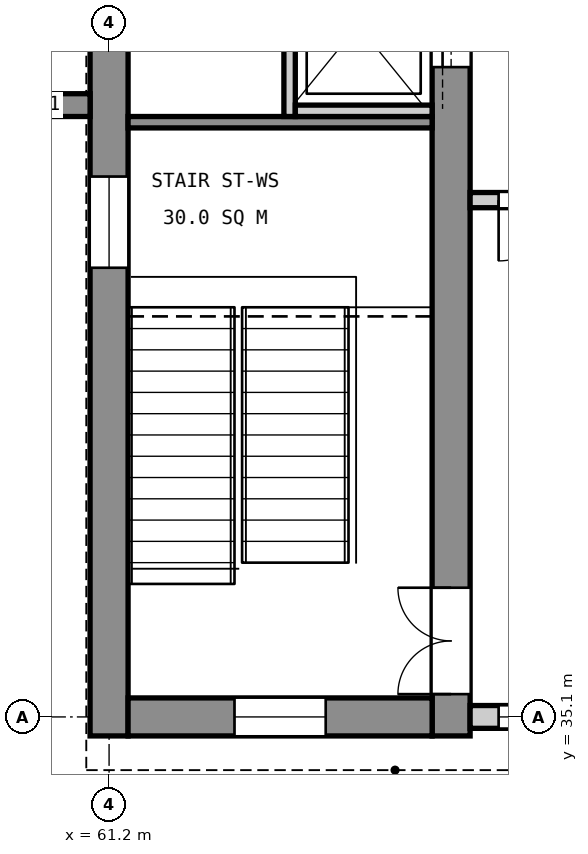
"""IFC4 building model, lengths in metres.
Left out: names, types, materials, properties, quantities, classifications, styles, units other than length and angle.
Written with IfcOpenShell. Run it as: python <this file> out.ifc"""

import sys

from ifc_helpers import new_model, si_unit, direction, frame, frame_2d, origin, place, context, subcontext, project, spatial, rectangle, extrude, element, fill, save


model = new_model("IFC4")
c1 = context("Model", 3, precision=1e-05, world=origin(), true_north=direction((0.0, 1.0)))
c2 = subcontext(c1, "Body", "Model", "MODEL_VIEW")
j1 = project(units=[si_unit("LENGTHUNIT", "METRE"), si_unit("PLANEANGLEUNIT", "RADIAN")], contexts=[c1])
p1 = place(None, origin())
s1 = spatial("IfcSite", under=j1, at=p1, CompositionType="ELEMENT")
p2 = place(p1, origin())
s2 = spatial("IfcBuilding", under=s1, at=p2, CompositionType="ELEMENT")
p3 = place(p2, frame((0.0, 0.0, 27.0)))
s3 = spatial("IfcBuildingStorey", under=s2, at=p3, CompositionType="ELEMENT", Elevation=27.0)
p4 = place(p3, frame((61.2, 34.85, 0.0), z_axis=(0.0, 0.0, 1.0), x_axis=(0.0, 1.0, 0.0)))
e1 = element("IfcWall", 1, at=p4, inside=s3, PredefinedType="SHEAR", context=c2, shape_type="SweptSolid", body=[
    extrude(rectangle(XDim=11.3, YDim=0.5, at=frame_2d((5.65, 0.0))), origin(), (0.0, 0.0, 1.0), 4.55),
])
p5 = place(p4, frame((6.16, 0.0, 3.4)))
e2 = element("IfcOpeningElement", 2, at=p5, cuts=e1, PredefinedType="OPENING", context=c2, shape_type="SweptSolid", body=[
    extrude(rectangle(XDim=1.2, YDim=0.9, at=frame_2d((0.6, 0.45))), frame((0.0, 0.26, 0.0), z_axis=(0.0, -1.0, 0.0), x_axis=(1.0, 0.0, 0.0)), (0.0, 0.0, 1.0), 0.52),
])
p6 = place(p3, frame((65.7, 34.85, 0.0), z_axis=(0.0, 0.0, 1.0), x_axis=(0.0, 1.0, 0.0)))
e3 = element("IfcWall", 3, at=p6, inside=s3, PredefinedType="SHEAR", context=c2, shape_type="SweptSolid", body=[
    extrude(rectangle(XDim=11.3, YDim=0.5, at=frame_2d((5.65, 0.0))), origin(), (0.0, 0.0, 1.0), 4.55),
])
p7 = place(p6, frame((0.55, 0.0, 0.0)))
e4 = element("IfcOpeningElement", 4, at=p7, cuts=e3, PredefinedType="OPENING", context=c2, shape_type="SweptSolid", body=[
    extrude(rectangle(XDim=1.4, YDim=2.1, at=frame_2d((0.7, 1.05))), frame((0.0, 0.26, 0.0), z_axis=(0.0, -1.0, 0.0), x_axis=(1.0, 0.0, 0.0)), (0.0, 0.0, 1.0), 0.52),
])
p8 = place(p6, frame((8.8, 0.0, 0.0)))
e5 = element("IfcOpeningElement", 5, at=p8, cuts=e3, PredefinedType="OPENING", context=c2, shape_type="SweptSolid", body=[
    extrude(rectangle(XDim=1.1, YDim=2.1, at=frame_2d((0.55, 1.05))), frame((0.0, 0.26, 0.0), z_axis=(0.0, -1.0, 0.0), x_axis=(1.0, 0.0, 0.0)), (0.0, 0.0, 1.0), 0.52),
])
p9 = place(p3, frame((61.45, 35.1, 0.0), z_axis=(0.0, 0.0, 1.0), x_axis=(1.0, 0.0, 0.0)))
e6 = element("IfcWall", 6, at=p9, inside=s3, PredefinedType="SHEAR", context=c2, shape_type="SweptSolid", body=[
    extrude(rectangle(XDim=4.0, YDim=0.5, at=frame_2d((2.0, 0.0))), origin(), (0.0, 0.0, 1.0), 4.55),
])
p10 = place(p9, frame((1.4, 0.0, 3.4)))
e7 = element("IfcOpeningElement", 7, at=p10, cuts=e6, PredefinedType="OPENING", context=c2, shape_type="SweptSolid", body=[
    extrude(rectangle(XDim=1.2, YDim=0.9, at=frame_2d((0.6, 0.45))), frame((0.0, 0.26, 0.0), z_axis=(0.0, -1.0, 0.0), x_axis=(1.0, 0.0, 0.0)), (0.0, 0.0, 1.0), 0.52),
])
p11 = place(p3, frame((60.95, 43.15, 0.0), z_axis=(0.0, 0.0, 1.0), x_axis=(-1.0, 0.0, 0.0)))
e8 = element("IfcWall", 8, at=p11, inside=s3, PredefinedType="SHEAR", context=c2, shape_type="SweptSolid", body=[
    extrude(rectangle(XDim=1.25, YDim=0.3, at=frame_2d((0.625, 0.0))), origin(), (0.0, 0.0, 1.0), 4.8),
])
p12 = place(p3, frame((61.45, 42.925, 0.0), z_axis=(0.0, 0.0, 1.0), x_axis=(1.0, 0.0, 0.0)))
e9 = element("IfcWall", 9, at=p12, inside=s3, PredefinedType="SOLIDWALL", context=c2, shape_type="SweptSolid", body=[
    extrude(rectangle(XDim=4.0, YDim=0.15, at=frame_2d((2.0, 0.0))), origin(), (0.0, 0.0, 1.0), 4.55),
])
p13 = place(p3, frame((63.575, 43.0, 0.0), z_axis=(0.0, 0.0, 1.0), x_axis=(0.0, 1.0, 0.0)))
e10 = element("IfcWall", 10, at=p13, inside=s3, PredefinedType="SOLIDWALL", context=c2, shape_type="SweptSolid", body=[
    extrude(rectangle(XDim=2.65, YDim=0.15, at=frame_2d((1.325, 0.0))), origin(), (0.0, 0.0, 1.0), 4.8),
])
p14 = place(p3, frame((63.65, 43.075, 0.0), z_axis=(0.0, 0.0, 1.0), x_axis=(1.0, 0.0, 0.0)))
e11 = element("IfcWall", 11, at=p14, inside=s3, PredefinedType="SOLIDWALL", context=c2, shape_type="SweptSolid", body=[
    extrude(rectangle(XDim=1.8, YDim=0.15, at=frame_2d((0.9, 0.0))), origin(), (0.0, 0.0, 1.0), 4.8),
])
p15 = place(p3, frame((65.95, 35.1, 0.0), z_axis=(0.0, 0.0, 1.0), x_axis=(1.0, 0.0, 0.0)))
e12 = element("IfcWall", 12, at=p15, inside=s3, PredefinedType="STANDARD", context=c2, shape_type="SweptSolid", body=[
    extrude(rectangle(XDim=1.95, YDim=0.3, at=frame_2d((0.975, 0.0))), origin(), (0.0, 0.0, 1.0), 3.85),
])
p16 = place(p15, frame((0.375, 0.0, 0.9)))
e13 = element("IfcOpeningElement", 13, at=p16, cuts=e12, PredefinedType="OPENING", context=c2, shape_type="SweptSolid", body=[
    extrude(rectangle(XDim=1.2, YDim=2.4, at=frame_2d((0.6, 1.2))), frame((0.0, 0.16, 0.0), z_axis=(0.0, -1.0, 0.0), x_axis=(1.0, 0.0, 0.0)), (0.0, 0.0, 1.0), 0.32),
])
p17 = place(p3, frame((65.95, 41.9, 0.0), z_axis=(0.0, 0.0, 1.0), x_axis=(1.0, 0.0, 0.0)))
e14 = element("IfcWall", 14, at=p17, inside=s3, PredefinedType="PARTITIONING", context=c2, shape_type="SweptSolid", body=[
    extrude(rectangle(XDim=2.35, YDim=0.2, at=frame_2d((1.175, 0.0))), origin(), (0.0, 0.0, 1.0), 3.55),
])
p18 = place(p17, frame((0.375, 0.0, 0.0)))
e15 = element("IfcOpeningElement", 15, at=p18, cuts=e14, PredefinedType="OPENING", context=c2, shape_type="SweptSolid", body=[
    extrude(rectangle(XDim=1.6, YDim=2.1, at=frame_2d((0.8, 1.05))), frame((0.0, 0.11, 0.0), z_axis=(0.0, -1.0, 0.0), x_axis=(1.0, 0.0, 0.0)), (0.0, 0.0, 1.0), 0.22),
])
p19 = place(p7, origin())
e16 = element("IfcDoor", 16, at=p19, inside=s3, OperationType="DOUBLE_DOOR_SINGLE_SWING", PredefinedType="DOOR", context=c2, shape_type="SweptSolid", body=[
    extrude(rectangle(XDim=1.4, YDim=2.1, at=frame_2d((0.7, 1.05))), frame((0.0, 0.025, 0.0), z_axis=(0.0, -1.0, 0.0), x_axis=(1.0, 0.0, 0.0)), (0.0, 0.0, 1.0), 0.05),
])
fill(e4, e16)
p20 = place(p8, origin())
e17 = element("IfcDoor", 17, at=p20, inside=s3, OperationType="SLIDING_TO_LEFT", PredefinedType="DOOR", context=c2, shape_type="SweptSolid", body=[
    extrude(rectangle(XDim=1.1, YDim=2.1, at=frame_2d((0.55, 1.05))), frame((0.0, 0.025, 0.0), z_axis=(0.0, -1.0, 0.0), x_axis=(1.0, 0.0, 0.0)), (0.0, 0.0, 1.0), 0.05),
])
fill(e5, e17)
p21 = place(p16, origin())
e18 = element("IfcWindow", 18, at=p21, inside=s3, PartitioningType="SINGLE_PANEL", PredefinedType="WINDOW", context=c2, shape_type="SweptSolid", body=[
    extrude(rectangle(XDim=1.2, YDim=2.4, at=frame_2d((0.6, 1.2))), frame((0.0, 0.03, 0.0), z_axis=(0.0, -1.0, 0.0), x_axis=(1.0, 0.0, 0.0)), (0.0, 0.0, 1.0), 0.06),
])
fill(e13, e18)
p22 = place(p5, origin())
e19 = element("IfcWindow", 19, at=p22, inside=s3, PartitioningType="SINGLE_PANEL", PredefinedType="WINDOW", context=c2, shape_type="SweptSolid", body=[
    extrude(rectangle(XDim=1.2, YDim=0.9, at=frame_2d((0.6, 0.45))), frame((0.0, 0.03, 0.0), z_axis=(0.0, -1.0, 0.0), x_axis=(1.0, 0.0, 0.0)), (0.0, 0.0, 1.0), 0.06),
])
fill(e2, e19)
p23 = place(p10, origin())
e20 = element("IfcWindow", 20, at=p23, inside=s3, PartitioningType="SINGLE_PANEL", PredefinedType="WINDOW", context=c2, shape_type="SweptSolid", body=[
    extrude(rectangle(XDim=1.2, YDim=0.9, at=frame_2d((0.6, 0.45))), frame((0.0, 0.03, 0.0), z_axis=(0.0, -1.0, 0.0), x_axis=(1.0, 0.0, 0.0)), (0.0, 0.0, 1.0), 0.06),
])
fill(e7, e20)
p24 = place(p18, frame((1.6, 0.0, 0.0), z_axis=(0.0, 0.0, 1.0), x_axis=(-1.0, 0.0, 0.0)))
e21 = element("IfcDoor", 21, at=p24, inside=s3, OperationType="DOUBLE_DOOR_SINGLE_SWING", PredefinedType="DOOR", context=c2, shape_type="SweptSolid", body=[
    extrude(rectangle(XDim=1.6, YDim=2.1, at=frame_2d((0.8, 1.05))), frame((0.0, 0.025, 0.0), z_axis=(0.0, -1.0, 0.0), x_axis=(1.0, 0.0, 0.0)), (0.0, 0.0, 1.0), 0.05),
])
fill(e15, e21)
save(model, sys.argv[1])
